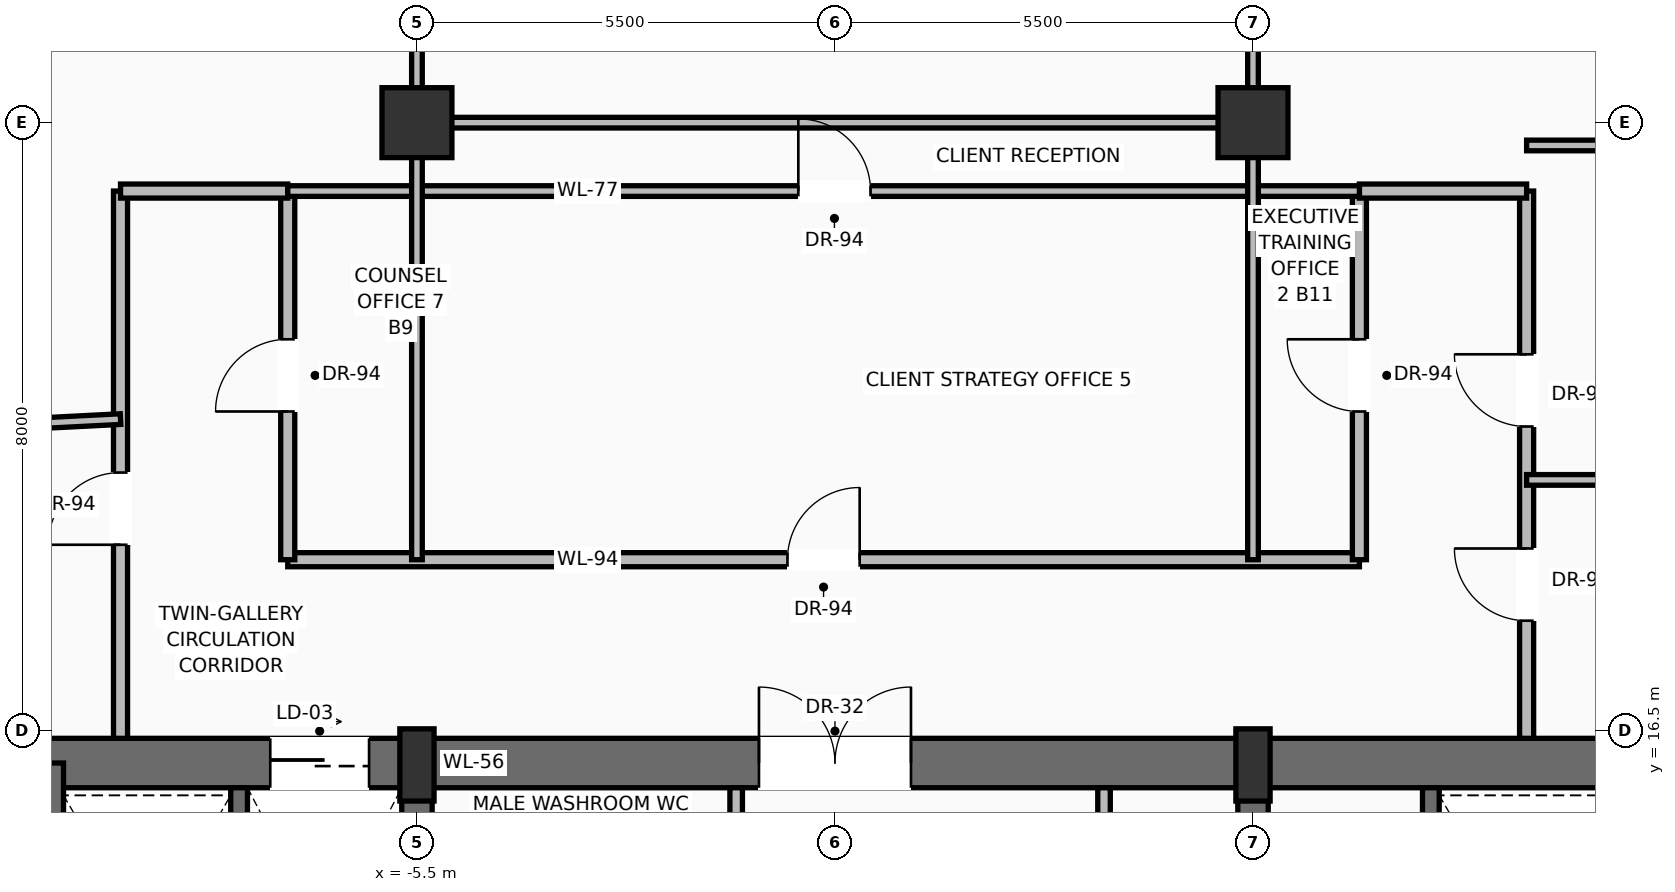
"""IFC4 building model, lengths in metres.
Left out: names, types, materials, properties, quantities, classifications, styles, units other than length and angle.
Written with IfcOpenShell. Run it as: python <this file> out.ifc"""

import sys

from ifc_helpers import new_model, si_unit, direction, frame, frame_2d, origin, origin_2d, place, context, subcontext, project, spatial, rectangle, extrude, source, transform, mapped, element, fill, save


model = new_model("IFC4")
c1 = context("Model", 3, precision=1e-05, world=origin(), true_north=direction((0.0, 1.0)))
c2 = subcontext(c1, "Body", "Model", "MODEL_VIEW")
j1 = project(units=[si_unit("LENGTHUNIT", "METRE"), si_unit("PLANEANGLEUNIT", "RADIAN")], contexts=[c1])
p1 = place(None, origin())
s1 = spatial("IfcSite", under=j1, at=p1, CompositionType="ELEMENT")
p2 = place(p1, origin())
s2 = spatial("IfcBuilding", under=s1, at=p2, CompositionType="ELEMENT")
p3 = place(p2, frame((0.0, 0.0, 136.7)))
s3 = spatial("IfcBuildingStorey", under=s2, at=p3, CompositionType="ELEMENT", Elevation=136.7)
p4 = place(p3, frame((-10.8, 16.075, 0.0), z_axis=(0.0, 0.0, 1.0), x_axis=(1.0, 0.0, 0.0)))
e1 = element("IfcWall", 1, at=p4, inside=s3, PredefinedType="SHEAR", context=c2, shape_type="SweptSolid", body=[
    extrude(rectangle(XDim=21.6, YDim=0.65, at=frame_2d((10.8, 0.0))), origin(), (0.0, 0.0, 1.0), 3.47),
])
p5 = place(p4, frame((3.37, 0.0, 0.0)))
e2 = element("IfcOpeningElement", 2, at=p5, cuts=e1, PredefinedType="OPENING", context=c2, shape_type="SweptSolid", body=[
    extrude(rectangle(XDim=1.3, YDim=2.3, at=frame_2d((0.65, 1.15))), frame((0.0, 0.335, 0.0), z_axis=(0.0, -1.0, 0.0), x_axis=(1.0, 0.0, 0.0)), (0.0, 0.0, 1.0), 0.67),
])
p6 = place(p4, frame((9.8, 0.0, 0.0)))
e3 = element("IfcOpeningElement", 3, at=p6, cuts=e1, PredefinedType="OPENING", context=c2, shape_type="SweptSolid", body=[
    extrude(rectangle(XDim=2.0, YDim=2.4, at=frame_2d((1.0, 1.2))), frame((0.0, 0.335, 0.0), z_axis=(0.0, -1.0, 0.0), x_axis=(1.0, 0.0, 0.0)), (0.0, 0.0, 1.0), 0.67),
])
p7 = place(p3, frame((-10.475, 0.525, 0.0), z_axis=(0.0, 0.0, 1.0), x_axis=(0.0, 1.0, 0.0)))
e4 = element("IfcWall", 4, at=p7, inside=s3, PredefinedType="SHEAR", context=c2, shape_type="SweptSolid", body=[
    extrude(rectangle(XDim=15.55, YDim=0.65, at=frame_2d((7.775, 0.0))), origin(), (0.0, 0.0, 1.0), 3.47),
])
p8 = place(p3, frame((-5.5, 0.525, 0.0), z_axis=(0.0, 0.0, 1.0), x_axis=(0.0, 1.0, 0.0)))
e5 = element("IfcWall", 5, at=p8, inside=s3, PredefinedType="SHEAR", context=c2, shape_type="SweptSolid", body=[
    extrude(rectangle(XDim=15.55, YDim=0.4, at=frame_2d((7.775, 0.0))), origin(), (0.0, 0.0, 1.0), 3.47),
])
p9 = place(p8, frame((8.975, 0.0, 0.0)))
e6 = element("IfcOpeningElement", 6, at=p9, cuts=e5, PredefinedType="OPENING", context=c2, shape_type="SweptSolid", body=[
    extrude(rectangle(XDim=1.1, YDim=2.2, at=frame_2d((0.55, 1.1))), frame((0.0, 0.21, 0.0), z_axis=(0.0, -1.0, 0.0), x_axis=(1.0, 0.0, 0.0)), (0.0, 0.0, 1.0), 0.42),
])
p10 = place(p3, frame((5.5, 0.525, 0.0), z_axis=(0.0, 0.0, 1.0), x_axis=(0.0, 1.0, 0.0)))
e7 = element("IfcWall", 7, at=p10, inside=s3, PredefinedType="SHEAR", context=c2, shape_type="SweptSolid", body=[
    extrude(rectangle(XDim=15.55, YDim=0.4, at=frame_2d((7.775, 0.0))), origin(), (0.0, 0.0, 1.0), 3.47),
])
p11 = place(p10, frame((8.975, 0.0, 0.0)))
e8 = element("IfcOpeningElement", 8, at=p11, cuts=e7, PredefinedType="OPENING", context=c2, shape_type="SweptSolid", body=[
    extrude(rectangle(XDim=1.1, YDim=2.2, at=frame_2d((0.55, 1.1))), frame((0.0, 0.21, 0.0), z_axis=(0.0, -1.0, 0.0), x_axis=(1.0, 0.0, 0.0)), (0.0, 0.0, 1.0), 0.42),
])
m1 = source(origin(), c2, "Body", "SweptSolid", [
    extrude(rectangle(XDim=0.45, YDim=0.95, at=origin_2d()), origin(), (0.0, 0.0, 1.0), 3.7),
])
for number, where, z_axis, x_axis in (
    (9, (-5.5, 16.05, 0.0), (0.0, 0.0, 1.0), (1.0, 0.0, 0.0)),
    (10, (5.5, 16.05, 0.0), (0.0, 0.0, 1.0), (1.0, 0.0, 0.0)),
):
    element("IfcColumn", number, at=place(p3, frame(where, z_axis=z_axis, x_axis=x_axis)), inside=s3, PredefinedType="PILASTER", context=c2, shape_type="MappedRepresentation", body=[
        mapped(m1, transform((0.0, 0.0, 0.0), scale=1.0)),
    ])
m2 = source(origin(), c2, "Body", "SweptSolid", [
    extrude(rectangle(XDim=0.92, YDim=0.92, at=origin_2d()), origin(), (0.0, 0.0, 1.0), 3.7),
])
for number, where, z_axis, x_axis in (
    (11, (-5.5, 24.5, 0.0), (0.0, 0.0, 1.0), (1.0, 0.0, 0.0)),
    (12, (5.5, 24.5, 0.0), (0.0, 0.0, 1.0), (1.0, 0.0, 0.0)),
):
    element("IfcColumn", number, at=place(p3, frame(where, z_axis=z_axis, x_axis=x_axis)), inside=s3, PredefinedType="COLUMN", context=c2, shape_type="MappedRepresentation", body=[
        mapped(m2, transform((0.0, 0.0, 0.0), scale=1.0)),
    ])
for number, where, z_axis, x_axis in (
    (13, (-7.84, 11.87, 0.0), (0.0, 0.0, 1.0), (0.0, 1.0, 0.0)),
    (14, (7.84, 11.87, 0.0), (0.0, 0.0, 1.0), (0.0, 1.0, 0.0)),
):
    element("IfcWall", number, at=place(p3, frame(where, z_axis=z_axis, x_axis=x_axis)), inside=s3, PredefinedType="SOLIDWALL", context=c2, shape_type="SweptSolid", body=[
        extrude(rectangle(XDim=3.88, YDim=0.22, at=frame_2d((1.94, 0.0))), origin(), (0.0, 0.0, 1.0), 3.47),
    ])
p12 = place(p3, frame((-1.3, 13.6, 0.0), z_axis=(0.0, 0.0, 1.0), x_axis=(0.0, 1.0, 0.0)))
e15 = element("IfcWall", 15, at=p12, inside=s3, PredefinedType="PARTITIONING", context=c2, shape_type="SweptSolid", body=[
    extrude(rectangle(XDim=2.15, YDim=0.165, at=frame_2d((1.075, 0.0))), origin(), (0.0, 0.0, 1.0), 3.462),
])
p13 = place(p12, frame((0.55, 0.0, 0.0)))
e16 = element("IfcOpeningElement", 16, at=p13, cuts=e15, PredefinedType="OPENING", context=c2, shape_type="SweptSolid", body=[
    extrude(rectangle(XDim=0.9, YDim=2.1, at=frame_2d((0.45, 1.05))), frame((0.0, 0.093, 0.0), z_axis=(0.0, -1.0, 0.0), x_axis=(1.0, 0.0, 0.0)), (0.0, 0.0, 1.0), 0.185),
])
p14 = place(p3, frame((3.54, 11.22, 0.0), z_axis=(0.0, 0.0, 1.0), x_axis=(0.0, 1.0, 0.0)))
e17 = element("IfcWall", 17, at=p14, inside=s3, PredefinedType="PARTITIONING", context=c2, shape_type="SweptSolid", body=[
    extrude(rectangle(XDim=4.53, YDim=0.165, at=frame_2d((2.265, 0.0))), origin(), (0.0, 0.0, 1.0), 3.462),
])
p15 = place(p14, frame((1.25, 0.0, 0.0)))
e18 = element("IfcOpeningElement", 18, at=p15, cuts=e17, PredefinedType="OPENING", context=c2, shape_type="SweptSolid", body=[
    extrude(rectangle(XDim=0.9, YDim=2.1, at=frame_2d((0.45, 1.05))), frame((0.0, 0.093, 0.0), z_axis=(0.0, -1.0, 0.0), x_axis=(1.0, 0.0, 0.0)), (0.0, 0.0, 1.0), 0.185),
])
p16 = place(p3, frame((-7.2, 18.75, 0.0), z_axis=(0.0, 0.0, 1.0), x_axis=(1.0, 0.0, 0.0)))
e19 = element("IfcWall", 19, at=p16, inside=s3, PredefinedType="PARTITIONING", context=c2, shape_type="SweptSolid", body=[
    extrude(rectangle(XDim=14.1, YDim=0.185, at=frame_2d((7.05, 0.0))), origin(), (0.0, 0.0, 1.0), 2.846),
])
p17 = place(p16, frame((6.575, 0.0, 0.0)))
e20 = element("IfcOpeningElement", 20, at=p17, cuts=e19, PredefinedType="OPENING", context=c2, shape_type="SweptSolid", body=[
    extrude(rectangle(XDim=0.95, YDim=2.2, at=frame_2d((0.475, 1.1))), frame((0.0, 0.103, 0.0), z_axis=(0.0, -1.0, 0.0), x_axis=(1.0, 0.0, 0.0)), (0.0, 0.0, 1.0), 0.205),
])
p18 = place(p3, frame((-7.2, 18.75, 0.0), z_axis=(0.0, 0.0, 1.0), x_axis=(0.0, 1.0, 0.0)))
e21 = element("IfcWall", 21, at=p18, inside=s3, PredefinedType="PARTITIONING", context=c2, shape_type="SweptSolid", body=[
    extrude(rectangle(XDim=4.85, YDim=0.185, at=frame_2d((2.425, 0.0))), origin(), (0.0, 0.0, 1.0), 3.462),
])
p19 = place(p18, frame((1.95, 0.0, 0.0)))
e22 = element("IfcOpeningElement", 22, at=p19, cuts=e21, PredefinedType="OPENING", context=c2, shape_type="SweptSolid", body=[
    extrude(rectangle(XDim=0.95, YDim=2.2, at=frame_2d((0.475, 1.1))), frame((0.0, 0.103, 0.0), z_axis=(0.0, -1.0, 0.0), x_axis=(1.0, 0.0, 0.0)), (0.0, 0.0, 1.0), 0.205),
])
p20 = place(p3, frame((6.9, 18.75, 0.0), z_axis=(0.0, 0.0, 1.0), x_axis=(0.0, 1.0, 0.0)))
e23 = element("IfcWall", 23, at=p20, inside=s3, PredefinedType="PARTITIONING", context=c2, shape_type="SweptSolid", body=[
    extrude(rectangle(XDim=4.85, YDim=0.185, at=frame_2d((2.425, 0.0))), origin(), (0.0, 0.0, 1.0), 3.462),
])
p21 = place(p20, frame((1.95, 0.0, 0.0)))
e24 = element("IfcOpeningElement", 24, at=p21, cuts=e23, PredefinedType="OPENING", context=c2, shape_type="SweptSolid", body=[
    extrude(rectangle(XDim=0.95, YDim=2.2, at=frame_2d((0.475, 1.1))), frame((0.0, 0.103, 0.0), z_axis=(0.0, -1.0, 0.0), x_axis=(1.0, 0.0, 0.0)), (0.0, 0.0, 1.0), 0.205),
])
p22 = place(p3, frame((-9.4, 16.4, 0.0), z_axis=(0.0, 0.0, 1.0), x_axis=(0.0, 1.0, 0.0)))
e25 = element("IfcWall", 25, at=p22, inside=s3, PredefinedType="PARTITIONING", context=c2, shape_type="SweptSolid", body=[
    extrude(rectangle(XDim=7.2, YDim=0.185, at=frame_2d((3.6, 0.0))), origin(), (0.0, 0.0, 1.0), 3.462),
])
p23 = place(p22, frame((2.547, 0.0, 0.0)))
e26 = element("IfcOpeningElement", 26, at=p23, cuts=e25, PredefinedType="OPENING", context=c2, shape_type="SweptSolid", body=[
    extrude(rectangle(XDim=0.95, YDim=2.2, at=frame_2d((0.475, 1.1))), frame((0.0, 0.103, 0.0), z_axis=(0.0, -1.0, 0.0), x_axis=(1.0, 0.0, 0.0)), (0.0, 0.0, 1.0), 0.205),
])
p24 = place(p3, frame((9.1, 16.4, 0.0), z_axis=(0.0, 0.0, 1.0), x_axis=(0.0, 1.0, 0.0)))
e27 = element("IfcWall", 27, at=p24, inside=s3, PredefinedType="PARTITIONING", context=c2, shape_type="SweptSolid", body=[
    extrude(rectangle(XDim=7.2, YDim=0.185, at=frame_2d((3.6, 0.0))), origin(), (0.0, 0.0, 1.0), 3.462),
])
p25 = place(p24, frame((4.103, 0.0, 0.0)))
e28 = element("IfcOpeningElement", 28, at=p25, cuts=e27, PredefinedType="OPENING", context=c2, shape_type="SweptSolid", body=[
    extrude(rectangle(XDim=0.95, YDim=2.2, at=frame_2d((0.475, 1.1))), frame((0.0, 0.103, 0.0), z_axis=(0.0, -1.0, 0.0), x_axis=(1.0, 0.0, 0.0)), (0.0, 0.0, 1.0), 0.205),
])
p26 = place(p24, frame((1.548, 0.0, 0.0)))
e29 = element("IfcOpeningElement", 29, at=p26, cuts=e27, PredefinedType="OPENING", context=c2, shape_type="SweptSolid", body=[
    extrude(rectangle(XDim=0.95, YDim=2.2, at=frame_2d((0.475, 1.1))), frame((0.0, 0.103, 0.0), z_axis=(0.0, -1.0, 0.0), x_axis=(1.0, 0.0, 0.0)), (0.0, 0.0, 1.0), 0.205),
])
p27 = place(p3, frame((-9.4, 23.6, 0.0), z_axis=(0.0, 0.0, 1.0), x_axis=(1.0, 0.0, 0.0)))
e30 = element("IfcWall", 30, at=p27, inside=s3, PredefinedType="PARTITIONING", context=c2, shape_type="SweptSolid", body=[
    extrude(rectangle(XDim=2.2, YDim=0.185, at=frame_2d((1.1, 0.0))), origin(), (0.0, 0.0, 1.0), 3.462),
])
p28 = place(p3, frame((6.9, 23.6, 0.0), z_axis=(0.0, 0.0, 1.0), x_axis=(1.0, 0.0, 0.0)))
e31 = element("IfcWall", 31, at=p28, inside=s3, PredefinedType="PARTITIONING", context=c2, shape_type="SweptSolid", body=[
    extrude(rectangle(XDim=2.2, YDim=0.185, at=frame_2d((1.1, 0.0))), origin(), (0.0, 0.0, 1.0), 3.462),
])
p29 = place(p3, frame((-7.2, 23.6, 0.0), z_axis=(0.0, 0.0, 1.0), x_axis=(1.0, 0.0, 0.0)))
e32 = element("IfcWall", 32, at=p29, inside=s3, PredefinedType="PARTITIONING", context=c2, shape_type="SweptSolid", body=[
    extrude(rectangle(XDim=14.1, YDim=0.14, at=frame_2d((7.05, 0.0))), origin(), (0.0, 0.0, 1.0), 3.462),
])
p30 = place(p29, frame((6.718, 0.0, 0.0)))
e33 = element("IfcOpeningElement", 33, at=p30, cuts=e32, PredefinedType="OPENING", context=c2, shape_type="SweptSolid", body=[
    extrude(rectangle(XDim=0.95, YDim=2.2, at=frame_2d((0.475, 1.1))), frame((0.0, 0.08, 0.0), z_axis=(0.0, -1.0, 0.0), x_axis=(1.0, 0.0, 0.0)), (0.0, 0.0, 1.0), 0.16),
])
for number, where, z_axis, x_axis in (
    (34, (-5.5, 18.75, 0.0), (0.0, 0.0, 1.0), (0.0, 1.0, 0.0)),
    (35, (5.5, 18.75, 0.0), (0.0, 0.0, 1.0), (0.0, 1.0, 0.0)),
):
    element("IfcWall", number, at=place(p3, frame(where, z_axis=z_axis, x_axis=x_axis)), inside=s3, PredefinedType="PARTITIONING", context=c2, shape_type="SweptSolid", body=[
        extrude(rectangle(XDim=13.75, YDim=0.14, at=frame_2d((6.875, 0.0))), origin(), (0.0, 0.0, 1.0), 2.846),
    ])
p31 = place(p3, frame((-5.5, 24.5, 0.0), z_axis=(0.0, 0.0, 1.0), x_axis=(1.0, 0.0, 0.0)))
e36 = element("IfcWall", 36, at=p31, inside=s3, PredefinedType="PARTITIONING", context=c2, shape_type="SweptSolid", body=[
    extrude(rectangle(XDim=11.0, YDim=0.14, at=frame_2d((5.5, 0.0))), origin(), (0.0, 0.0, 1.0), 2.846),
])
p32 = place(p3, frame((-19.332, 20.092, 0.0), z_axis=(0.0, 0.0, 1.0), x_axis=(0.998695571357, 0.051060314835, 0.0)))
e37 = element("IfcWall", 37, at=p32, inside=s3, PredefinedType="PARTITIONING", context=c2, shape_type="SweptSolid", body=[
    extrude(rectangle(XDim=9.945, YDim=0.14, at=frame_2d((4.973, 0.0))), origin(), (0.0, 0.0, 1.0), 3.462),
])
p33 = place(p3, frame((9.1, 19.8, 0.0), z_axis=(0.0, 0.0, 1.0), x_axis=(1.0, 0.0, 0.0)))
e38 = element("IfcWall", 38, at=p33, inside=s3, PredefinedType="PARTITIONING", context=c2, shape_type="SweptSolid", body=[
    extrude(rectangle(XDim=10.724, YDim=0.14, at=frame_2d((5.362, 0.0))), origin(), (0.0, 0.0, 1.0), 3.462),
])
p34 = place(p3, frame((9.1, 24.2, 0.0), z_axis=(0.0, 0.0, 1.0), x_axis=(1.0, 0.0, 0.0)))
e39 = element("IfcWall", 39, at=p34, inside=s3, PredefinedType="PARTITIONING", context=c2, shape_type="SweptSolid", body=[
    extrude(rectangle(XDim=7.918, YDim=0.14, at=frame_2d((3.959, 0.0))), origin(), (0.0, 0.0, 1.0), 3.462),
])
m3 = source(origin(), c2, "Body", "SweptSolid", [
    extrude(rectangle(XDim=1.3, YDim=2.3, at=frame_2d((0.65, 1.15))), frame((0.0, 0.025, 0.0), z_axis=(0.0, -1.0, 0.0), x_axis=(1.0, 0.0, 0.0)), (0.0, 0.0, 1.0), 0.05),
])
p35 = place(p5, origin())
e40 = element("IfcDoor", 40, at=p35, inside=s3, OperationType="SLIDING_TO_RIGHT", PredefinedType="DOOR", context=c2, shape_type="MappedRepresentation", body=[
    mapped(m3, transform((0.0, 0.0, 0.0), scale=1.0)),
])
fill(e2, e40)
m4 = source(origin(), c2, "Body", "SweptSolid", [
    extrude(rectangle(XDim=2.0, YDim=2.4, at=frame_2d((1.0, 1.2))), frame((0.0, 0.025, 0.0), z_axis=(0.0, -1.0, 0.0), x_axis=(1.0, 0.0, 0.0)), (0.0, 0.0, 1.0), 0.05),
])
p36 = place(p6, origin())
e41 = element("IfcDoor", 41, at=p36, inside=s3, OperationType="DOUBLE_DOOR_SINGLE_SWING", PredefinedType="DOOR", context=c2, shape_type="MappedRepresentation", body=[
    mapped(m4, transform((0.0, 0.0, 0.0), scale=1.0)),
])
fill(e3, e41)
m5 = source(origin(), c2, "Body", "SweptSolid", [
    extrude(rectangle(XDim=0.95, YDim=2.2, at=frame_2d((0.475, 1.1))), frame((0.0, 0.025, 0.0), z_axis=(0.0, -1.0, 0.0), x_axis=(1.0, 0.0, 0.0)), (0.0, 0.0, 1.0), 0.05),
])
p37 = place(p17, origin())
e42 = element("IfcDoor", 42, at=p37, inside=s3, OperationType="SINGLE_SWING_RIGHT", PredefinedType="DOOR", context=c2, shape_type="MappedRepresentation", body=[
    mapped(m5, transform((0.0, 0.0, 0.0), scale=1.0)),
])
fill(e20, e42)
p38 = place(p23, origin())
e43 = element("IfcDoor", 43, at=p38, inside=s3, OperationType="SINGLE_SWING_LEFT", PredefinedType="DOOR", context=c2, shape_type="MappedRepresentation", body=[
    mapped(m5, transform((0.0, 0.0, 0.0), scale=1.0)),
])
fill(e26, e43)
p39 = place(p25, origin())
e44 = element("IfcDoor", 44, at=p39, inside=s3, OperationType="SINGLE_SWING_RIGHT", PredefinedType="DOOR", context=c2, shape_type="MappedRepresentation", body=[
    mapped(m5, transform((0.0, 0.0, 0.0), scale=1.0)),
])
fill(e28, e44)
p40 = place(p26, origin())
e45 = element("IfcDoor", 45, at=p40, inside=s3, OperationType="SINGLE_SWING_RIGHT", PredefinedType="DOOR", context=c2, shape_type="MappedRepresentation", body=[
    mapped(m5, transform((0.0, 0.0, 0.0), scale=1.0)),
])
fill(e29, e45)
p41 = place(p19, origin())
e46 = element("IfcDoor", 46, at=p41, inside=s3, OperationType="SINGLE_SWING_LEFT", PredefinedType="DOOR", context=c2, shape_type="MappedRepresentation", body=[
    mapped(m5, transform((0.0, 0.0, 0.0), scale=1.0)),
])
fill(e22, e46)
p42 = place(p21, origin())
e47 = element("IfcDoor", 47, at=p42, inside=s3, OperationType="SINGLE_SWING_RIGHT", PredefinedType="DOOR", context=c2, shape_type="MappedRepresentation", body=[
    mapped(m5, transform((0.0, 0.0, 0.0), scale=1.0)),
])
fill(e24, e47)
p43 = place(p30, origin())
e48 = element("IfcDoor", 48, at=p43, inside=s3, OperationType="SINGLE_SWING_LEFT", PredefinedType="DOOR", context=c2, shape_type="MappedRepresentation", body=[
    mapped(m5, transform((0.0, 0.0, 0.0), scale=1.0)),
])
fill(e33, e48)
save(model, sys.argv[1])
